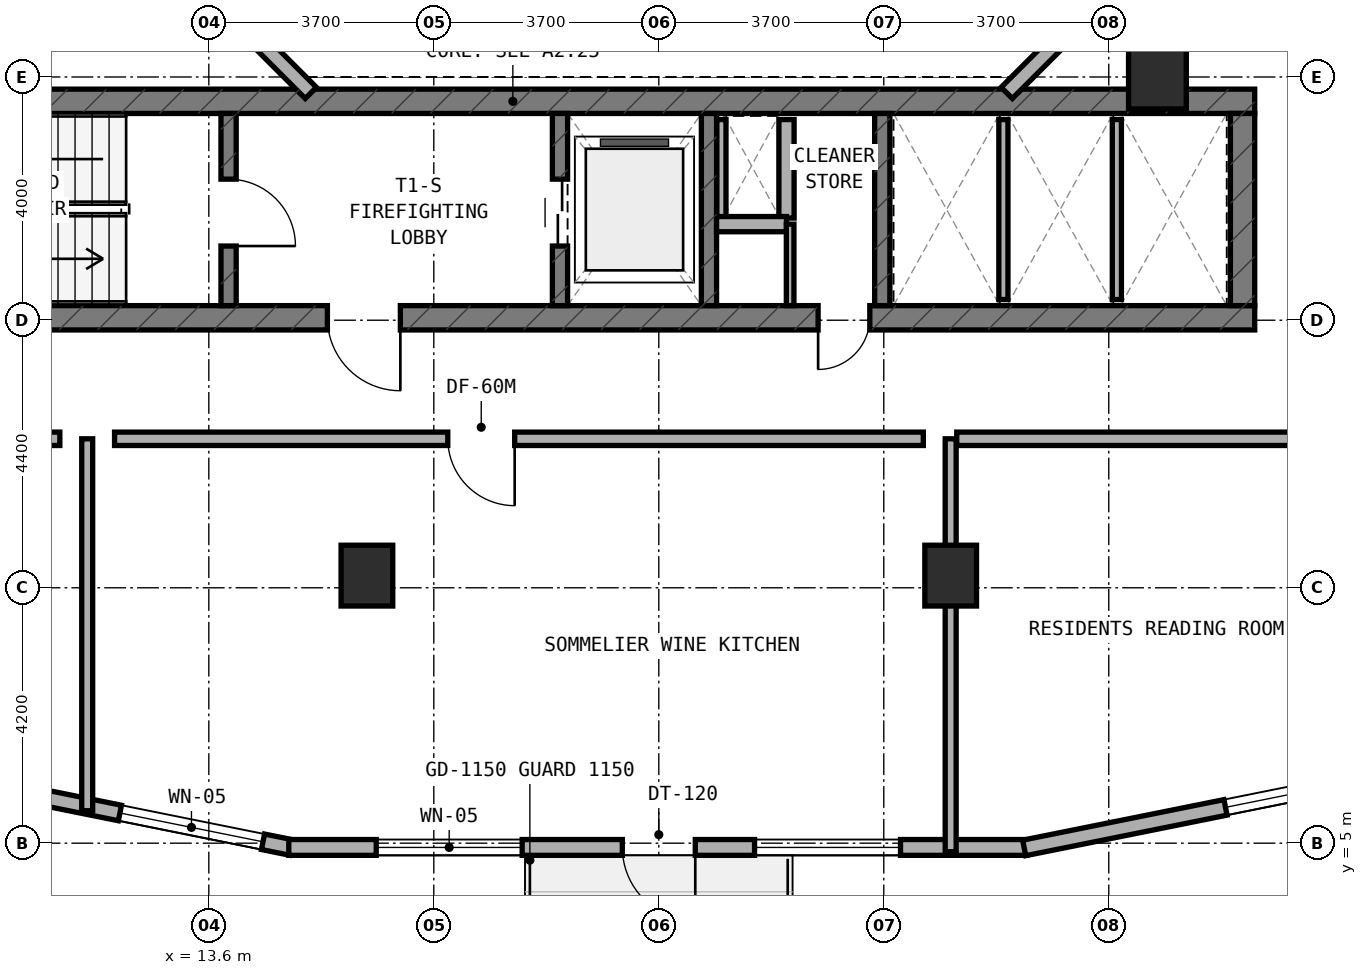
"""IFC4 building model, lengths in metres.
Left out: names, types, materials, properties, quantities, classifications, styles, units other than length and angle.
Written with IfcOpenShell. Run it as: python <this file> out.ifc"""

import sys

from ifc_helpers import new_model, si_unit, direction, frame, frame_2d, origin, origin_2d, place, context, subcontext, project, spatial, rectangle, extrude, element, fill, save


model = new_model("IFC4")
c1 = context("Model", 3, precision=1e-05, world=origin(), true_north=direction((0.0, 1.0)))
c2 = subcontext(c1, "Body", "Model", "MODEL_VIEW")
j1 = project(units=[si_unit("LENGTHUNIT", "METRE"), si_unit("PLANEANGLEUNIT", "RADIAN")], contexts=[c1])
p1 = place(None, origin())
s1 = spatial("IfcSite", under=j1, at=p1, CompositionType="ELEMENT")
p2 = place(p1, origin())
s2 = spatial("IfcBuilding", under=s1, at=p2, CompositionType="ELEMENT")
p3 = place(p2, frame((0.0, 0.0, 112.5)))
s3 = spatial("IfcBuildingStorey", under=s2, at=p3, CompositionType="ELEMENT", Elevation=112.5)
p4 = place(p3, frame((6.4, 13.64, 0.0), z_axis=(0.0, 0.0, 1.0), x_axis=(1.0, 0.0, 0.0)))
e1 = element("IfcWall", 1, at=p4, inside=s3, PredefinedType="SHEAR", context=c2, shape_type="SweptSolid", body=[
    extrude(rectangle(XDim=24.4, YDim=0.4, at=frame_2d((12.2, 0.0))), origin(), (0.0, 0.0, 1.0), 3.5),
])
p5 = place(p4, frame((9.15, 0.0, 0.0)))
e2 = element("IfcOpeningElement", 2, at=p5, cuts=e1, PredefinedType="OPENING", context=c2, shape_type="SweptSolid", body=[
    extrude(rectangle(XDim=1.2, YDim=2.15, at=frame_2d((0.6, 1.075))), frame((0.0, 0.21, 0.0), z_axis=(0.0, -1.0, 0.0), x_axis=(1.0, 0.0, 0.0)), (0.0, 0.0, 1.0), 0.42),
])
p6 = place(p4, frame((17.22, 0.0, 0.0)))
e3 = element("IfcOpeningElement", 3, at=p6, cuts=e1, PredefinedType="OPENING", context=c2, shape_type="SweptSolid", body=[
    extrude(rectangle(XDim=0.85, YDim=2.1, at=frame_2d((0.425, 1.05))), frame((0.0, 0.21, 0.0), z_axis=(0.0, -1.0, 0.0), x_axis=(1.0, 0.0, 0.0)), (0.0, 0.0, 1.0), 0.42),
])
p7 = place(p3, frame((6.4, 17.2, 0.0), z_axis=(0.0, 0.0, 1.0), x_axis=(1.0, 0.0, 0.0)))
e4 = element("IfcWall", 4, at=p7, inside=s3, PredefinedType="SHEAR", context=c2, shape_type="SweptSolid", body=[
    extrude(rectangle(XDim=24.4, YDim=0.4, at=frame_2d((12.2, 0.0))), origin(), (0.0, 0.0, 1.0), 3.5),
])
p8 = place(p3, frame((30.6, 13.84, 0.0), z_axis=(0.0, 0.0, 1.0), x_axis=(0.0, 1.0, 0.0)))
e5 = element("IfcWall", 5, at=p8, inside=s3, PredefinedType="SHEAR", context=c2, shape_type="SweptSolid", body=[
    extrude(rectangle(XDim=3.16, YDim=0.4, at=frame_2d((1.58, 0.0))), origin(), (0.0, 0.0, 1.0), 3.5),
])
p9 = place(p3, frame((13.925, 13.84, 0.0), z_axis=(0.0, 0.0, 1.0), x_axis=(0.0, 1.0, 0.0)))
e6 = element("IfcWall", 6, at=p9, inside=s3, PredefinedType="STANDARD", context=c2, shape_type="SweptSolid", body=[
    extrude(rectangle(XDim=3.16, YDim=0.25, at=frame_2d((1.58, 0.0))), origin(), (0.0, 0.0, 1.0), 3.22),
])
p10 = place(p9, frame((0.98, 0.0, 0.0)))
e7 = element("IfcOpeningElement", 7, at=p10, cuts=e6, PredefinedType="OPENING", context=c2, shape_type="SweptSolid", body=[
    extrude(rectangle(XDim=1.1, YDim=2.15, at=frame_2d((0.55, 1.075))), frame((0.0, 0.135, 0.0), z_axis=(0.0, -1.0, 0.0), x_axis=(1.0, 0.0, 0.0)), (0.0, 0.0, 1.0), 0.27),
])
p11 = place(p3, frame((19.375, 13.84, 0.0), z_axis=(0.0, 0.0, 1.0), x_axis=(0.0, 1.0, 0.0)))
e8 = element("IfcWall", 8, at=p11, inside=s3, PredefinedType="STANDARD", context=c2, shape_type="SweptSolid", body=[
    extrude(rectangle(XDim=3.16, YDim=0.25, at=frame_2d((1.58, 0.0))), origin(), (0.0, 0.0, 1.0), 3.22),
])
p12 = place(p11, frame((0.98, 0.0, 0.0)))
e9 = element("IfcOpeningElement", 9, at=p12, cuts=e8, PredefinedType="OPENING", context=c2, shape_type="SweptSolid", body=[
    extrude(rectangle(XDim=1.1, YDim=2.15, at=frame_2d((0.55, 1.075))), frame((0.0, 0.135, 0.0), z_axis=(0.0, -1.0, 0.0), x_axis=(1.0, 0.0, 0.0)), (0.0, 0.0, 1.0), 0.27),
])
for number, where, z_axis, x_axis in (
    (10, (21.825, 13.84, 0.0), (0.0, 0.0, 1.0), (0.0, 1.0, 0.0)),
    (11, (24.675, 13.84, 0.0), (0.0, 0.0, 1.0), (0.0, 1.0, 0.0)),
):
    element("IfcWall", number, at=place(p3, frame(where, z_axis=z_axis, x_axis=x_axis)), inside=s3, PredefinedType="STANDARD", context=c2, shape_type="SweptSolid", body=[
        extrude(rectangle(XDim=3.16, YDim=0.25, at=frame_2d((1.58, 0.0))), origin(), (0.0, 0.0, 1.0), 3.22),
    ])
for number, where, z_axis, x_axis in (
    (12, (16.2, 9.4, 0.0), (0.0, 0.0, 1.0), (1.0, 0.0, 0.0)),
    (13, (25.8, 9.4, 0.0), (0.0, 0.0, 1.0), (1.0, 0.0, 0.0)),
):
    element("IfcColumn", number, at=place(p3, frame(where, z_axis=z_axis, x_axis=x_axis)), inside=s3, PredefinedType="COLUMN", context=c2, shape_type="SweptSolid", body=[
        extrude(rectangle(XDim=0.85, YDim=1.0, at=origin_2d()), origin(), (0.0, 0.0, 1.0), 3.5),
    ])
p13 = place(p3, frame((29.2, 17.65, 0.0), z_axis=(0.0, 0.0, 1.0), x_axis=(1.0, 0.0, 0.0)))
e14 = element("IfcColumn", 14, at=p13, inside=s3, PredefinedType="COLUMN", context=c2, shape_type="SweptSolid", body=[
    extrude(rectangle(XDim=0.95, YDim=1.15, at=origin_2d()), origin(), (0.0, 0.0, 1.0), 3.5),
])
p14 = place(p3, frame((6.018, 6.729, 0.0), z_axis=(0.0, 0.0, 1.0), x_axis=(0.980317172899, -0.197429077186, 0.0)))
e15 = element("IfcWall", 15, at=p14, inside=s3, PredefinedType="STANDARD", context=c2, shape_type="SweptSolid", body=[
    extrude(rectangle(XDim=9.117, YDim=0.26, at=frame_2d((4.559, 0.0))), origin(), (0.0, 0.0, 1.0), 3.22),
])
p15 = place(p14, frame((1.585, 0.0, 0.8)))
e16 = element("IfcOpeningElement", 16, at=p15, cuts=e15, PredefinedType="OPENING", context=c2, shape_type="SweptSolid", body=[
    extrude(rectangle(XDim=2.4, YDim=1.6, at=frame_2d((1.2, 0.8))), frame((0.0, 0.14, 0.0), z_axis=(0.0, -1.0, 0.0), x_axis=(1.0, 0.0, 0.0)), (0.0, 0.0, 1.0), 0.28),
])
p16 = place(p14, frame((6.243, 0.0, 0.8)))
e17 = element("IfcOpeningElement", 17, at=p16, cuts=e15, PredefinedType="OPENING", context=c2, shape_type="SweptSolid", body=[
    extrude(rectangle(XDim=2.4, YDim=1.6, at=frame_2d((1.2, 0.8))), frame((0.0, 0.14, 0.0), z_axis=(0.0, -1.0, 0.0), x_axis=(1.0, 0.0, 0.0)), (0.0, 0.0, 1.0), 0.28),
])
p17 = place(p3, frame((14.915, 4.93, 0.0), z_axis=(0.0, 0.0, 1.0), x_axis=(1.0, 0.0, 0.0)))
e18 = element("IfcWall", 18, at=p17, inside=s3, PredefinedType="STANDARD", context=c2, shape_type="SweptSolid", body=[
    extrude(rectangle(XDim=12.135, YDim=0.26, at=frame_2d((6.067, 0.0))), origin(), (0.0, 0.0, 1.0), 3.22),
])
p18 = place(p17, frame((5.485, 0.0, 0.0)))
e19 = element("IfcOpeningElement", 19, at=p18, cuts=e18, PredefinedType="OPENING", context=c2, shape_type="SweptSolid", body=[
    extrude(rectangle(XDim=1.2, YDim=2.15, at=frame_2d((0.6, 1.075))), frame((0.0, 0.14, 0.0), z_axis=(0.0, -1.0, 0.0), x_axis=(1.0, 0.0, 0.0)), (0.0, 0.0, 1.0), 0.28),
])
p19 = place(p17, frame((1.438, 0.0, 0.8)))
e20 = element("IfcOpeningElement", 20, at=p19, cuts=e18, PredefinedType="OPENING", context=c2, shape_type="SweptSolid", body=[
    extrude(rectangle(XDim=2.4, YDim=1.6, at=frame_2d((1.2, 0.8))), frame((0.0, 0.14, 0.0), z_axis=(0.0, -1.0, 0.0), x_axis=(1.0, 0.0, 0.0)), (0.0, 0.0, 1.0), 0.28),
])
p20 = place(p17, frame((7.66, 0.0, 0.8)))
e21 = element("IfcOpeningElement", 21, at=p20, cuts=e18, PredefinedType="OPENING", context=c2, shape_type="SweptSolid", body=[
    extrude(rectangle(XDim=2.4, YDim=1.6, at=frame_2d((1.2, 0.8))), frame((0.0, 0.14, 0.0), z_axis=(0.0, -1.0, 0.0), x_axis=(1.0, 0.0, 0.0)), (0.0, 0.0, 1.0), 0.28),
])
p21 = place(p3, frame((27.009, 4.922, 0.0), z_axis=(0.0, 0.0, 1.0), x_axis=(0.980321298532, 0.197408590603, 0.0)))
e22 = element("IfcWall", 22, at=p21, inside=s3, PredefinedType="STANDARD", context=c2, shape_type="SweptSolid", body=[
    extrude(rectangle(XDim=9.153, YDim=0.26, at=frame_2d((4.577, 0.0))), origin(), (0.0, 0.0, 1.0), 3.22),
])
p22 = place(p21, frame((3.377, 0.0, 0.8)))
e23 = element("IfcOpeningElement", 23, at=p22, cuts=e22, PredefinedType="OPENING", context=c2, shape_type="SweptSolid", body=[
    extrude(rectangle(XDim=2.4, YDim=1.6, at=frame_2d((1.2, 0.8))), frame((0.0, 0.14, 0.0), z_axis=(0.0, -1.0, 0.0), x_axis=(1.0, 0.0, 0.0)), (0.0, 0.0, 1.0), 0.28),
])
for number, where, z_axis, x_axis in (
    (24, (26.722, 17.338, 0.0), (0.0, 0.0, 1.0), (0.707, 0.707, 0.0)),
    (25, (13.444, 19.172, 0.0), (0.0, 0.0, 1.0), (0.707, -0.707, 0.0)),
):
    element("IfcWall", number, at=place(p3, frame(where, z_axis=z_axis, x_axis=x_axis)), inside=s3, PredefinedType="STANDARD", context=c2, shape_type="SweptSolid", body=[
        extrude(rectangle(XDim=2.594, YDim=0.26, at=frame_2d((1.297, 0.0))), origin(), (0.0, 0.0, 1.0), 3.22),
    ])
p23 = place(p3, frame((22.03, 15.28, 0.0), z_axis=(0.0, 0.0, 1.0), x_axis=(0.0, 1.0, 0.0)))
e26 = element("IfcWall", 26, at=p23, inside=s3, PredefinedType="PARTITIONING", context=c2, shape_type="SweptSolid", body=[
    extrude(rectangle(XDim=1.62, YDim=0.15, at=frame_2d((0.81, 0.0))), origin(), (0.0, 0.0, 1.0), 3.22),
])
p24 = place(p3, frame((23.1, 15.28, 0.0), z_axis=(0.0, 0.0, 1.0), x_axis=(0.0, 1.0, 0.0)))
e27 = element("IfcWall", 27, at=p24, inside=s3, PredefinedType="SOLIDWALL", context=c2, shape_type="SweptSolid", body=[
    extrude(rectangle(XDim=1.62, YDim=0.25, at=frame_2d((0.81, 0.0))), origin(), (0.0, 0.0, 1.0), 3.22),
])
p25 = place(p3, frame((21.95, 15.18, 0.0), z_axis=(0.0, 0.0, 1.0), x_axis=(1.0, 0.0, 0.0)))
e28 = element("IfcWall", 28, at=p25, inside=s3, PredefinedType="SOLIDWALL", context=c2, shape_type="SweptSolid", body=[
    extrude(rectangle(XDim=1.15, YDim=0.25, at=frame_2d((0.575, 0.0))), origin(), (0.0, 0.0, 1.0), 3.22),
])
p26 = place(p3, frame((23.16, 13.84, 0.0), z_axis=(0.0, 0.0, 1.0), x_axis=(0.0, 1.0, 0.0)))
e29 = element("IfcWall", 29, at=p26, inside=s3, PredefinedType="PARTITIONING", context=c2, shape_type="SweptSolid", body=[
    extrude(rectangle(XDim=1.34, YDim=0.125, at=frame_2d((0.67, 0.0))), origin(), (0.0, 0.0, 1.0), 3.22),
])
p27 = place(p3, frame((26.667, 13.94, 0.0), z_axis=(0.0, 0.0, 1.0), x_axis=(0.0, 1.0, 0.0)))
e30 = element("IfcWall", 30, at=p27, inside=s3, PredefinedType="PARTITIONING", context=c2, shape_type="SweptSolid", body=[
    extrude(rectangle(XDim=2.96, YDim=0.15, at=frame_2d((1.48, 0.0))), origin(), (0.0, 0.0, 1.0), 3.22),
])
p28 = place(p3, frame((28.533, 13.94, 0.0), z_axis=(0.0, 0.0, 1.0), x_axis=(0.0, 1.0, 0.0)))
e31 = element("IfcWall", 31, at=p28, inside=s3, PredefinedType="PARTITIONING", context=c2, shape_type="SweptSolid", body=[
    extrude(rectangle(XDim=2.96, YDim=0.15, at=frame_2d((1.48, 0.0))), origin(), (0.0, 0.0, 1.0), 2.695),
])
p29 = place(p3, frame((1.41, 11.65, 0.0), z_axis=(0.0, 0.0, 1.0), x_axis=(1.0, 0.0, 0.0)))
e32 = element("IfcWall", 32, at=p29, inside=s3, PredefinedType="SOLIDWALL", context=c2, shape_type="SweptSolid", body=[
    extrude(rectangle(XDim=9.74, YDim=0.22, at=frame_2d((4.87, 0.0))), origin(), (0.0, 0.0, 1.0), 2.695),
])
p30 = place(p29, frame((3.878, 0.0, 0.0)))
e33 = element("IfcOpeningElement", 33, at=p30, cuts=e32, PredefinedType="OPENING", context=c2, shape_type="SweptSolid", body=[
    extrude(rectangle(XDim=1.1, YDim=2.1, at=frame_2d((0.55, 1.05))), frame((0.0, 0.12, 0.0), z_axis=(0.0, -1.0, 0.0), x_axis=(1.0, 0.0, 0.0)), (0.0, 0.0, 1.0), 0.24),
])
p31 = place(p3, frame((11.6, 5.534, 0.0), z_axis=(0.0, 0.0, 1.0), x_axis=(0.0, 1.0, 0.0)))
e34 = element("IfcWall", 34, at=p31, inside=s3, PredefinedType="SOLIDWALL", context=c2, shape_type="SweptSolid", body=[
    extrude(rectangle(XDim=6.116, YDim=0.18, at=frame_2d((3.058, 0.0))), origin(), (0.0, 0.0, 1.0), 2.835),
])
p32 = place(p3, frame((12.05, 11.65, 0.0), z_axis=(0.0, 0.0, 1.0), x_axis=(1.0, 0.0, 0.0)))
e35 = element("IfcWall", 35, at=p32, inside=s3, PredefinedType="SOLIDWALL", context=c2, shape_type="SweptSolid", body=[
    extrude(rectangle(XDim=13.3, YDim=0.22, at=frame_2d((6.65, 0.0))), origin(), (0.0, 0.0, 1.0), 2.695),
])
p33 = place(p32, frame((5.48, 0.0, 0.0)))
e36 = element("IfcOpeningElement", 36, at=p33, cuts=e35, PredefinedType="OPENING", context=c2, shape_type="SweptSolid", body=[
    extrude(rectangle(XDim=1.1, YDim=2.1, at=frame_2d((0.55, 1.05))), frame((0.0, 0.12, 0.0), z_axis=(0.0, -1.0, 0.0), x_axis=(1.0, 0.0, 0.0)), (0.0, 0.0, 1.0), 0.24),
])
p34 = place(p3, frame((25.8, 4.86, 0.0), z_axis=(0.0, 0.0, 1.0), x_axis=(0.0, 1.0, 0.0)))
e37 = element("IfcWall", 37, at=p34, inside=s3, PredefinedType="SOLIDWALL", context=c2, shape_type="SweptSolid", body=[
    extrude(rectangle(XDim=6.79, YDim=0.18, at=frame_2d((3.395, 0.0))), origin(), (0.0, 0.0, 1.0), 2.695),
])
p35 = place(p3, frame((25.9, 11.65, 0.0), z_axis=(0.0, 0.0, 1.0), x_axis=(1.0, 0.0, 0.0)))
e38 = element("IfcWall", 38, at=p35, inside=s3, PredefinedType="SOLIDWALL", context=c2, shape_type="SweptSolid", body=[
    extrude(rectangle(XDim=15.04, YDim=0.22, at=frame_2d((7.52, 0.0))), origin(), (0.0, 0.0, 1.0), 2.695),
])
p36 = place(p35, frame((6.33, 0.0, 0.0)))
e39 = element("IfcOpeningElement", 39, at=p36, cuts=e38, PredefinedType="OPENING", context=c2, shape_type="SweptSolid", body=[
    extrude(rectangle(XDim=0.95, YDim=2.1, at=frame_2d((0.475, 1.05))), frame((0.0, 0.12, 0.0), z_axis=(0.0, -1.0, 0.0), x_axis=(1.0, 0.0, 0.0)), (0.0, 0.0, 1.0), 0.24),
])
p37 = place(p16, origin())
e40 = element("IfcWindow", 40, at=p37, inside=s3, PartitioningType="SINGLE_PANEL", PredefinedType="WINDOW", context=c2, shape_type="SweptSolid", body=[
    extrude(rectangle(XDim=2.4, YDim=1.6, at=frame_2d((1.2, 0.8))), frame((0.0, 0.03, 0.0), z_axis=(0.0, -1.0, 0.0), x_axis=(1.0, 0.0, 0.0)), (0.0, 0.0, 1.0), 0.06),
])
fill(e17, e40)
p38 = place(p18, frame((1.2, 0.0, 0.0), z_axis=(0.0, 0.0, 1.0), x_axis=(-1.0, 0.0, 0.0)))
e41 = element("IfcDoor", 41, at=p38, inside=s3, OperationType="SINGLE_SWING_LEFT", PredefinedType="DOOR", context=c2, shape_type="SweptSolid", body=[
    extrude(rectangle(XDim=1.2, YDim=2.15, at=frame_2d((0.6, 1.075))), frame((0.0, 0.025, 0.0), z_axis=(0.0, -1.0, 0.0), x_axis=(1.0, 0.0, 0.0)), (0.0, 0.0, 1.0), 0.05),
])
fill(e19, e41)
p39 = place(p19, origin())
e42 = element("IfcWindow", 42, at=p39, inside=s3, PartitioningType="SINGLE_PANEL", PredefinedType="WINDOW", context=c2, shape_type="SweptSolid", body=[
    extrude(rectangle(XDim=2.4, YDim=1.6, at=frame_2d((1.2, 0.8))), frame((0.0, 0.03, 0.0), z_axis=(0.0, -1.0, 0.0), x_axis=(1.0, 0.0, 0.0)), (0.0, 0.0, 1.0), 0.06),
])
fill(e20, e42)
p40 = place(p20, origin())
e43 = element("IfcWindow", 43, at=p40, inside=s3, PartitioningType="SINGLE_PANEL", PredefinedType="WINDOW", context=c2, shape_type="SweptSolid", body=[
    extrude(rectangle(XDim=2.4, YDim=1.6, at=frame_2d((1.2, 0.8))), frame((0.0, 0.03, 0.0), z_axis=(0.0, -1.0, 0.0), x_axis=(1.0, 0.0, 0.0)), (0.0, 0.0, 1.0), 0.06),
])
fill(e21, e43)
p41 = place(p22, origin())
e44 = element("IfcWindow", 44, at=p41, inside=s3, PartitioningType="SINGLE_PANEL", PredefinedType="WINDOW", context=c2, shape_type="SweptSolid", body=[
    extrude(rectangle(XDim=2.4, YDim=1.6, at=frame_2d((1.2, 0.8))), frame((0.0, 0.03, 0.0), z_axis=(0.0, -1.0, 0.0), x_axis=(1.0, 0.0, 0.0)), (0.0, 0.0, 1.0), 0.06),
])
fill(e23, e44)
p42 = place(p10, frame((1.1, 0.0, 0.0), z_axis=(0.0, 0.0, 1.0), x_axis=(-1.0, 0.0, 0.0)))
e45 = element("IfcDoor", 45, at=p42, inside=s3, OperationType="SINGLE_SWING_RIGHT", PredefinedType="DOOR", context=c2, shape_type="SweptSolid", body=[
    extrude(rectangle(XDim=1.1, YDim=2.15, at=frame_2d((0.55, 1.075))), frame((0.0, 0.025, 0.0), z_axis=(0.0, -1.0, 0.0), x_axis=(1.0, 0.0, 0.0)), (0.0, 0.0, 1.0), 0.05),
])
fill(e7, e45)
p43 = place(p5, frame((1.2, 0.0, 0.0), z_axis=(0.0, 0.0, 1.0), x_axis=(-1.0, 0.0, 0.0)))
e46 = element("IfcDoor", 46, at=p43, inside=s3, OperationType="SINGLE_SWING_LEFT", PredefinedType="DOOR", context=c2, shape_type="SweptSolid", body=[
    extrude(rectangle(XDim=1.2, YDim=2.15, at=frame_2d((0.6, 1.075))), frame((0.0, 0.025, 0.0), z_axis=(0.0, -1.0, 0.0), x_axis=(1.0, 0.0, 0.0)), (0.0, 0.0, 1.0), 0.05),
])
fill(e2, e46)
p44 = place(p12, origin())
e47 = element("IfcDoor", 47, at=p44, inside=s3, OperationType="DOUBLE_DOOR_SLIDING", PredefinedType="DOOR", context=c2, shape_type="SweptSolid", body=[
    extrude(rectangle(XDim=1.1, YDim=2.15, at=frame_2d((0.55, 1.075))), frame((0.0, 0.025, 0.0), z_axis=(0.0, -1.0, 0.0), x_axis=(1.0, 0.0, 0.0)), (0.0, 0.0, 1.0), 0.05),
])
fill(e9, e47)
p45 = place(p6, frame((0.85, 0.0, 0.0), z_axis=(0.0, 0.0, 1.0), x_axis=(-1.0, 0.0, 0.0)))
e48 = element("IfcDoor", 48, at=p45, inside=s3, OperationType="SINGLE_SWING_RIGHT", PredefinedType="DOOR", context=c2, shape_type="SweptSolid", body=[
    extrude(rectangle(XDim=0.85, YDim=2.1, at=frame_2d((0.425, 1.05))), frame((0.0, 0.025, 0.0), z_axis=(0.0, -1.0, 0.0), x_axis=(1.0, 0.0, 0.0)), (0.0, 0.0, 1.0), 0.05),
])
fill(e3, e48)
p46 = place(p33, frame((1.1, 0.0, 0.0), z_axis=(0.0, 0.0, 1.0), x_axis=(-1.0, 0.0, 0.0)))
e49 = element("IfcDoor", 49, at=p46, inside=s3, OperationType="SINGLE_SWING_LEFT", PredefinedType="DOOR", context=c2, shape_type="SweptSolid", body=[
    extrude(rectangle(XDim=1.1, YDim=2.1, at=frame_2d((0.55, 1.05))), frame((0.0, 0.025, 0.0), z_axis=(0.0, -1.0, 0.0), x_axis=(1.0, 0.0, 0.0)), (0.0, 0.0, 1.0), 0.05),
])
fill(e36, e49)
save(model, sys.argv[1])
